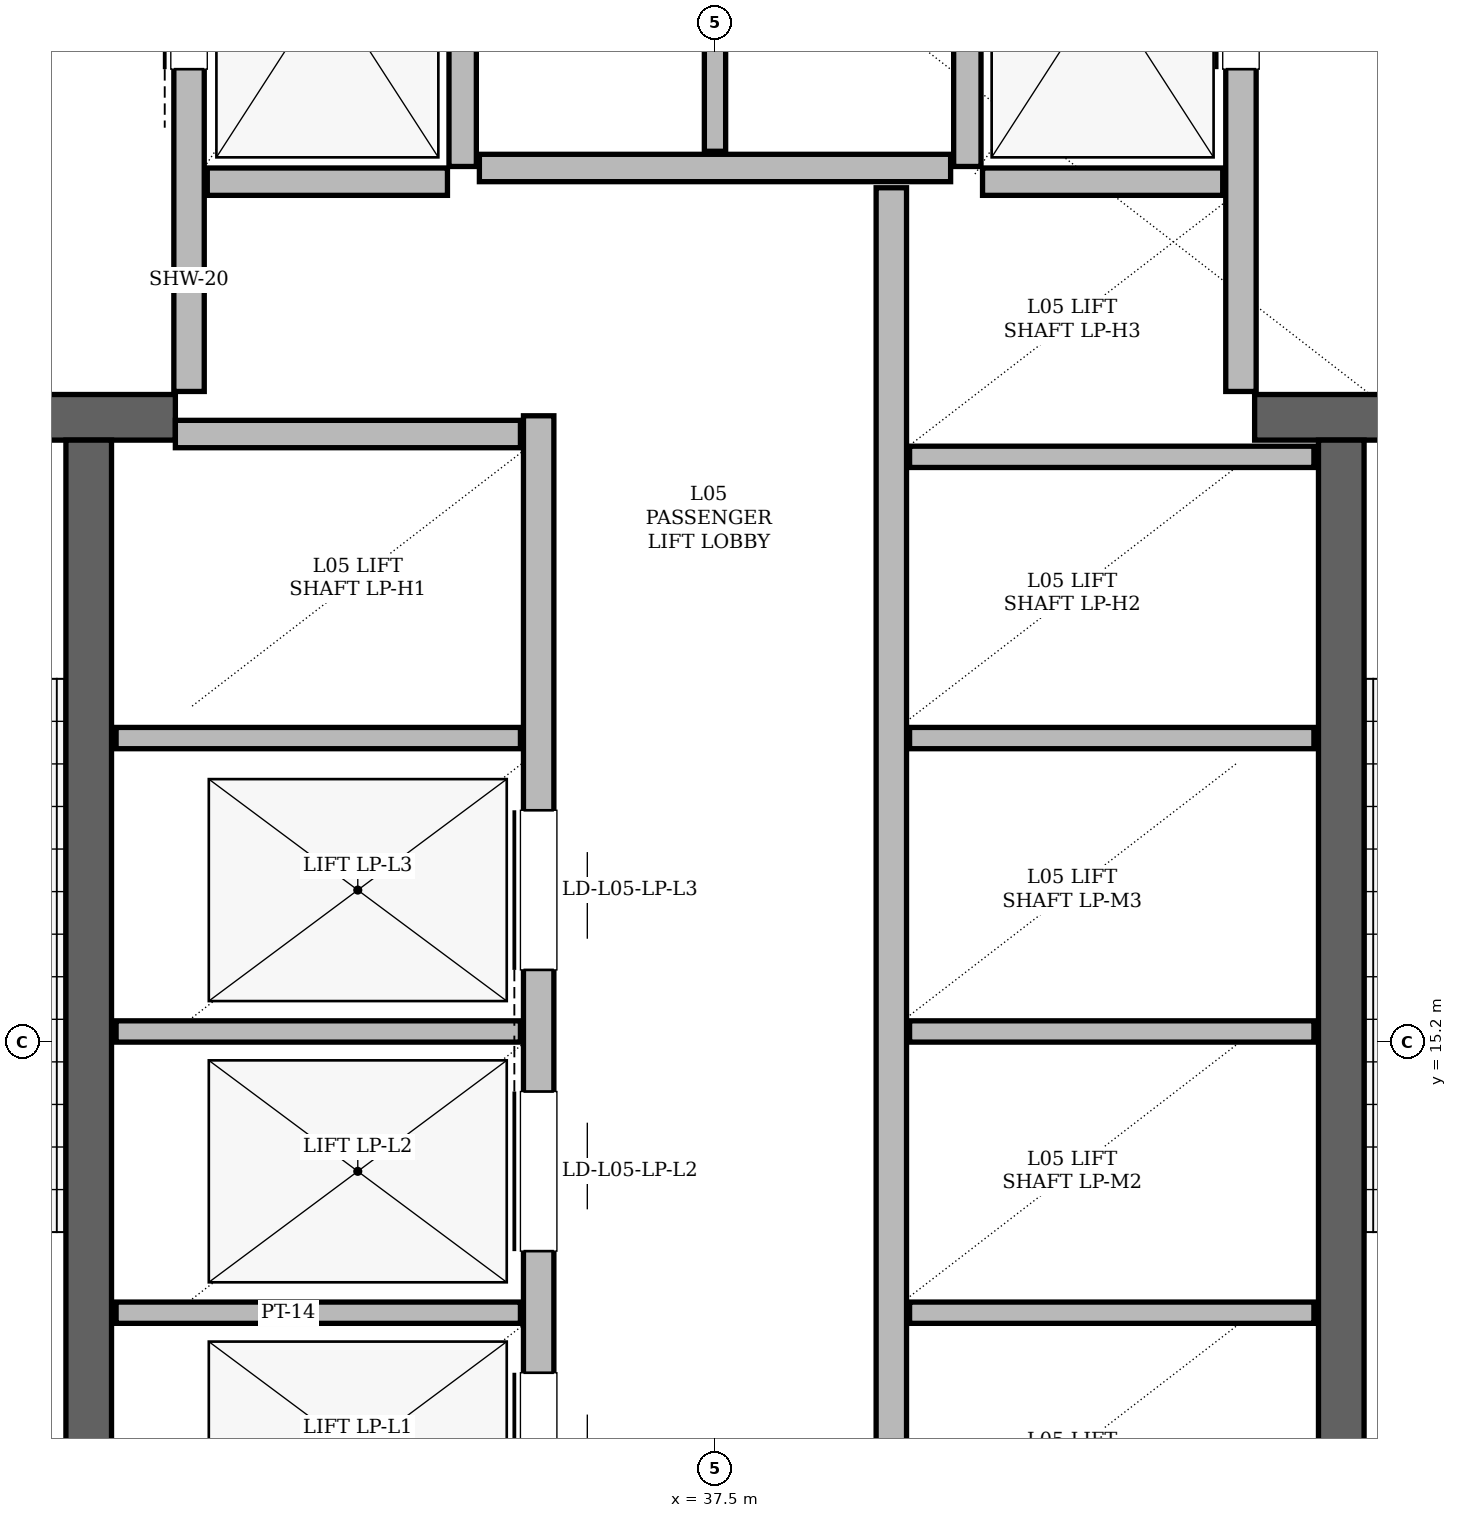
"""IFC4 building model, lengths in metres.
Left out: names, types, materials, properties, quantities, classifications, styles, units other than length and angle.
Written with IfcOpenShell. Run it as: python <this file> out.ifc"""

import sys

from ifc_helpers import new_model, si_unit, direction, frame, frame_2d, origin, place, context, subcontext, project, spatial, rectangle, extrude, element, fill, save


model = new_model("IFC4")
c1 = context("Model", 3, precision=1e-05, world=origin(), true_north=direction((0.0, 1.0)))
c2 = subcontext(c1, "Body", "Model", "MODEL_VIEW")
j1 = project(units=[si_unit("LENGTHUNIT", "METRE"), si_unit("PLANEANGLEUNIT", "RADIAN")], contexts=[c1])
p1 = place(None, origin())
s1 = spatial("IfcSite", under=j1, at=p1, CompositionType="ELEMENT")
p2 = place(p1, origin())
s2 = spatial("IfcBuilding", under=s1, at=p2, CompositionType="ELEMENT")
p3 = place(p2, frame((0.0, 0.0, 22.5)))
s3 = spatial("IfcBuildingStorey", under=s2, at=p3, CompositionType="ELEMENT", Elevation=22.5)
p4 = place(p3, frame((29.94, 19.31, 0.0), z_axis=(0.0, 0.0, 1.0), x_axis=(1.0, 0.0, 0.0)))
e1 = element("IfcWall", 1, at=p4, inside=s3, PredefinedType="SHEAR", context=c2, shape_type="SweptSolid", body=[
    extrude(rectangle(XDim=4.01, YDim=0.3, at=frame_2d((2.005, 0.0))), origin(), (0.0, 0.0, 1.0), 4.56),
])
p5 = place(p4, frame((1.01, 0.0, 0.0)))
e2 = element("IfcOpeningElement", 2, at=p5, cuts=e1, PredefinedType="OPENING", context=c2, shape_type="SweptSolid", body=[
    extrude(rectangle(XDim=1.4, YDim=2.2, at=frame_2d((0.7, 1.1))), frame((0.0, 0.15, 0.0), z_axis=(0.0, -1.0, 0.0), x_axis=(1.0, 0.0, 0.0)), (0.0, 0.0, 1.0), 0.3),
])
p6 = place(p3, frame((41.05, 19.31, 0.0), z_axis=(0.0, 0.0, 1.0), x_axis=(1.0, 0.0, 0.0)))
e3 = element("IfcWall", 3, at=p6, inside=s3, PredefinedType="SHEAR", context=c2, shape_type="SweptSolid", body=[
    extrude(rectangle(XDim=4.01, YDim=0.3, at=frame_2d((2.005, 0.0))), origin(), (0.0, 0.0, 1.0), 4.56),
])
p7 = place(p6, frame((1.6, 0.0, 0.0)))
e4 = element("IfcOpeningElement", 4, at=p7, cuts=e3, PredefinedType="OPENING", context=c2, shape_type="SweptSolid", body=[
    extrude(rectangle(XDim=1.4, YDim=2.2, at=frame_2d((0.7, 1.1))), frame((0.0, 0.15, 0.0), z_axis=(0.0, -1.0, 0.0), x_axis=(1.0, 0.0, 0.0)), (0.0, 0.0, 1.0), 0.3),
])
for number, where, z_axis, x_axis in (
    (5, (33.38, 11.54, 0.0), (0.0, 0.0, 1.0), (0.0, 1.0, 0.0)),
    (6, (41.62, 11.54, 0.0), (0.0, 0.0, 1.0), (0.0, 1.0, 0.0)),
):
    element("IfcWall", number, at=place(p3, frame(where, z_axis=z_axis, x_axis=x_axis)), inside=s3, PredefinedType="SHEAR", context=c2, shape_type="SweptSolid", body=[
        extrude(rectangle(XDim=7.62, YDim=0.3, at=frame_2d((3.81, 0.0))), origin(), (0.0, 0.0, 1.0), 4.56),
    ])
p8 = place(p3, frame((34.04, 19.48, 0.0), z_axis=(0.0, 0.0, 1.0), x_axis=(0.0, 1.0, 0.0)))
e7 = element("IfcWall", 7, at=p8, inside=s3, PredefinedType="PARTITIONING", context=c2, shape_type="SweptSolid", body=[
    extrude(rectangle(XDim=4.5, YDim=0.2, at=frame_2d((2.25, 0.0))), origin(), (0.0, 0.0, 1.0), 3.6),
])
p9 = place(p8, frame((2.12, 0.0, 0.0)))
e8 = element("IfcOpeningElement", 8, at=p9, cuts=e7, PredefinedType="OPENING", context=c2, shape_type="SweptSolid", body=[
    extrude(rectangle(XDim=1.1, YDim=2.2, at=frame_2d((0.55, 1.1))), frame((0.0, 0.1, 0.0), z_axis=(0.0, -1.0, 0.0), x_axis=(1.0, 0.0, 0.0)), (0.0, 0.0, 1.0), 0.2),
])
p10 = place(p3, frame((35.84, 20.96, 0.0), z_axis=(0.0, 0.0, 1.0), x_axis=(0.0, 1.0, 0.0)))
e9 = element("IfcWall", 9, at=p10, inside=s3, PredefinedType="PARTITIONING", context=c2, shape_type="SweptSolid", body=[
    extrude(rectangle(XDim=3.02, YDim=0.18, at=frame_2d((1.51, 0.0))), origin(), (0.0, 0.0, 1.0), 3.6),
])
p11 = place(p3, frame((34.16, 20.86, 0.0), z_axis=(0.0, 0.0, 1.0), x_axis=(1.0, 0.0, 0.0)))
e10 = element("IfcWall", 10, at=p11, inside=s3, PredefinedType="PARTITIONING", context=c2, shape_type="SweptSolid", body=[
    extrude(rectangle(XDim=1.58, YDim=0.18, at=frame_2d((0.79, 0.0))), origin(), (0.0, 0.0, 1.0), 4.56),
])
p12 = place(p3, frame((40.96, 19.48, 0.0), z_axis=(0.0, 0.0, 1.0), x_axis=(0.0, 1.0, 0.0)))
e11 = element("IfcWall", 11, at=p12, inside=s3, PredefinedType="PARTITIONING", context=c2, shape_type="SweptSolid", body=[
    extrude(rectangle(XDim=4.5, YDim=0.2, at=frame_2d((2.25, 0.0))), origin(), (0.0, 0.0, 1.0), 3.6),
])
p13 = place(p12, frame((2.12, 0.0, 0.0)))
e12 = element("IfcOpeningElement", 12, at=p13, cuts=e11, PredefinedType="OPENING", context=c2, shape_type="SweptSolid", body=[
    extrude(rectangle(XDim=1.1, YDim=2.2, at=frame_2d((0.55, 1.1))), frame((0.0, 0.1, 0.0), z_axis=(0.0, -1.0, 0.0), x_axis=(1.0, 0.0, 0.0)), (0.0, 0.0, 1.0), 0.2),
])
p14 = place(p3, frame((39.16, 20.96, 0.0), z_axis=(0.0, 0.0, 1.0), x_axis=(0.0, 1.0, 0.0)))
e13 = element("IfcWall", 13, at=p14, inside=s3, PredefinedType="PARTITIONING", context=c2, shape_type="SweptSolid", body=[
    extrude(rectangle(XDim=3.02, YDim=0.18, at=frame_2d((1.51, 0.0))), origin(), (0.0, 0.0, 1.0), 3.6),
])
p15 = place(p3, frame((39.26, 20.86, 0.0), z_axis=(0.0, 0.0, 1.0), x_axis=(1.0, 0.0, 0.0)))
e14 = element("IfcWall", 14, at=p15, inside=s3, PredefinedType="PARTITIONING", context=c2, shape_type="SweptSolid", body=[
    extrude(rectangle(XDim=1.58, YDim=0.18, at=frame_2d((0.79, 0.0))), origin(), (0.0, 0.0, 1.0), 4.56),
])
p16 = place(p3, frame((36.34, 11.72, 0.0), z_axis=(0.0, 0.0, 1.0), x_axis=(0.0, 1.0, 0.0)))
e15 = element("IfcWall", 15, at=p16, inside=s3, PredefinedType="PARTITIONING", context=c2, shape_type="SweptSolid", body=[
    extrude(rectangle(XDim=7.6, YDim=0.2, at=frame_2d((3.8, 0.0))), origin(), (0.0, 0.0, 1.0), 4.56),
])
p17 = place(p16, frame((0.255, 0.0, 0.0)))
e16 = element("IfcOpeningElement", 16, at=p17, cuts=e15, PredefinedType="OPENING", context=c2, shape_type="SweptSolid", body=[
    extrude(rectangle(XDim=1.05, YDim=2.15, at=frame_2d((0.525, 1.075))), frame((0.0, 0.1, 0.0), z_axis=(0.0, -1.0, 0.0), x_axis=(1.0, 0.0, 0.0)), (0.0, 0.0, 1.0), 0.2),
])
p18 = place(p16, frame((2.105, 0.0, 0.0)))
e17 = element("IfcOpeningElement", 17, at=p18, cuts=e15, PredefinedType="OPENING", context=c2, shape_type="SweptSolid", body=[
    extrude(rectangle(XDim=1.05, YDim=2.15, at=frame_2d((0.525, 1.075))), frame((0.0, 0.1, 0.0), z_axis=(0.0, -1.0, 0.0), x_axis=(1.0, 0.0, 0.0)), (0.0, 0.0, 1.0), 0.2),
])
p19 = place(p16, frame((3.955, 0.0, 0.0)))
e18 = element("IfcOpeningElement", 18, at=p19, cuts=e15, PredefinedType="OPENING", context=c2, shape_type="SweptSolid", body=[
    extrude(rectangle(XDim=1.05, YDim=2.15, at=frame_2d((0.525, 1.075))), frame((0.0, 0.1, 0.0), z_axis=(0.0, -1.0, 0.0), x_axis=(1.0, 0.0, 0.0)), (0.0, 0.0, 1.0), 0.2),
])
p20 = place(p3, frame((33.95, 19.2, 0.0), z_axis=(0.0, 0.0, 1.0), x_axis=(1.0, 0.0, 0.0)))
e19 = element("IfcWall", 19, at=p20, inside=s3, PredefinedType="PARTITIONING", context=c2, shape_type="SweptSolid", body=[
    extrude(rectangle(XDim=2.27, YDim=0.18, at=frame_2d((1.135, 0.0))), origin(), (0.0, 0.0, 1.0), 4.56),
])
for number, where, z_axis, x_axis in (
    (20, (33.56, 13.42, 0.0), (0.0, 0.0, 1.0), (1.0, 0.0, 0.0)),
    (21, (33.56, 15.27, 0.0), (0.0, 0.0, 1.0), (1.0, 0.0, 0.0)),
    (22, (33.56, 17.2, 0.0), (0.0, 0.0, 1.0), (1.0, 0.0, 0.0)),
):
    element("IfcWall", number, at=place(p3, frame(where, z_axis=z_axis, x_axis=x_axis)), inside=s3, PredefinedType="PARTITIONING", context=c2, shape_type="SweptSolid", body=[
        extrude(rectangle(XDim=2.66, YDim=0.14, at=frame_2d((1.33, 0.0))), origin(), (0.0, 0.0, 1.0), 4.56),
    ])
p21 = place(p3, frame((38.66, 11.72, 0.0), z_axis=(0.0, 0.0, 1.0), x_axis=(0.0, 1.0, 0.0)))
e23 = element("IfcWall", 23, at=p21, inside=s3, PredefinedType="PARTITIONING", context=c2, shape_type="SweptSolid", body=[
    extrude(rectangle(XDim=9.1, YDim=0.2, at=frame_2d((4.55, 0.0))), origin(), (0.0, 0.0, 1.0), 4.56),
])
for number, where, z_axis, x_axis in (
    (24, (38.78, 13.42, 0.0), (0.0, 0.0, 1.0), (1.0, 0.0, 0.0)),
    (25, (38.78, 15.27, 0.0), (0.0, 0.0, 1.0), (1.0, 0.0, 0.0)),
    (26, (38.78, 17.2, 0.0), (0.0, 0.0, 1.0), (1.0, 0.0, 0.0)),
    (27, (38.78, 19.05, 0.0), (0.0, 0.0, 1.0), (1.0, 0.0, 0.0)),
):
    element("IfcWall", number, at=place(p3, frame(where, z_axis=z_axis, x_axis=x_axis)), inside=s3, PredefinedType="PARTITIONING", context=c2, shape_type="SweptSolid", body=[
        extrude(rectangle(XDim=2.66, YDim=0.14, at=frame_2d((1.33, 0.0))), origin(), (0.0, 0.0, 1.0), 4.56),
    ])
p22 = place(p3, frame((35.95, 20.95, 0.0), z_axis=(0.0, 0.0, 1.0), x_axis=(1.0, 0.0, 0.0)))
e28 = element("IfcWall", 28, at=p22, inside=s3, PredefinedType="PARTITIONING", context=c2, shape_type="SweptSolid", body=[
    extrude(rectangle(XDim=3.1, YDim=0.18, at=frame_2d((1.55, 0.0))), origin(), (0.0, 0.0, 1.0), 4.56),
])
p23 = place(p3, frame((37.5, 21.06, 0.0), z_axis=(0.0, 0.0, 1.0), x_axis=(0.0, 1.0, 0.0)))
e29 = element("IfcWall", 29, at=p23, inside=s3, PredefinedType="PARTITIONING", context=c2, shape_type="SweptSolid", body=[
    extrude(rectangle(XDim=2.92, YDim=0.14, at=frame_2d((1.46, 0.0))), origin(), (0.0, 0.0, 1.0), 3.6),
])
p24 = place(p9, origin())
e30 = element("IfcDoor", 30, at=p24, inside=s3, OperationType="SLIDING_TO_LEFT", PredefinedType="DOOR", context=c2, shape_type="SweptSolid", body=[
    extrude(rectangle(XDim=1.1, YDim=2.2, at=frame_2d((0.55, 1.1))), frame((0.0, 0.025, 0.0), z_axis=(0.0, -1.0, 0.0), x_axis=(1.0, 0.0, 0.0)), (0.0, 0.0, 1.0), 0.05),
])
fill(e8, e30)
p25 = place(p13, origin())
e31 = element("IfcDoor", 31, at=p25, inside=s3, OperationType="SLIDING_TO_RIGHT", PredefinedType="DOOR", context=c2, shape_type="SweptSolid", body=[
    extrude(rectangle(XDim=1.1, YDim=2.2, at=frame_2d((0.55, 1.1))), frame((0.0, 0.025, 0.0), z_axis=(0.0, -1.0, 0.0), x_axis=(1.0, 0.0, 0.0)), (0.0, 0.0, 1.0), 0.05),
])
fill(e12, e31)
p26 = place(p17, origin())
e32 = element("IfcDoor", 32, at=p26, inside=s3, OperationType="SLIDING_TO_LEFT", PredefinedType="DOOR", context=c2, shape_type="SweptSolid", body=[
    extrude(rectangle(XDim=1.05, YDim=2.15, at=frame_2d((0.525, 1.075))), frame((0.0, 0.025, 0.0), z_axis=(0.0, -1.0, 0.0), x_axis=(1.0, 0.0, 0.0)), (0.0, 0.0, 1.0), 0.05),
])
fill(e16, e32)
p27 = place(p18, origin())
e33 = element("IfcDoor", 33, at=p27, inside=s3, OperationType="SLIDING_TO_RIGHT", PredefinedType="DOOR", context=c2, shape_type="SweptSolid", body=[
    extrude(rectangle(XDim=1.05, YDim=2.15, at=frame_2d((0.525, 1.075))), frame((0.0, 0.025, 0.0), z_axis=(0.0, -1.0, 0.0), x_axis=(1.0, 0.0, 0.0)), (0.0, 0.0, 1.0), 0.05),
])
fill(e17, e33)
p28 = place(p19, origin())
e34 = element("IfcDoor", 34, at=p28, inside=s3, OperationType="SLIDING_TO_LEFT", PredefinedType="DOOR", context=c2, shape_type="SweptSolid", body=[
    extrude(rectangle(XDim=1.05, YDim=2.15, at=frame_2d((0.525, 1.075))), frame((0.0, 0.025, 0.0), z_axis=(0.0, -1.0, 0.0), x_axis=(1.0, 0.0, 0.0)), (0.0, 0.0, 1.0), 0.05),
])
fill(e18, e34)
save(model, sys.argv[1])
